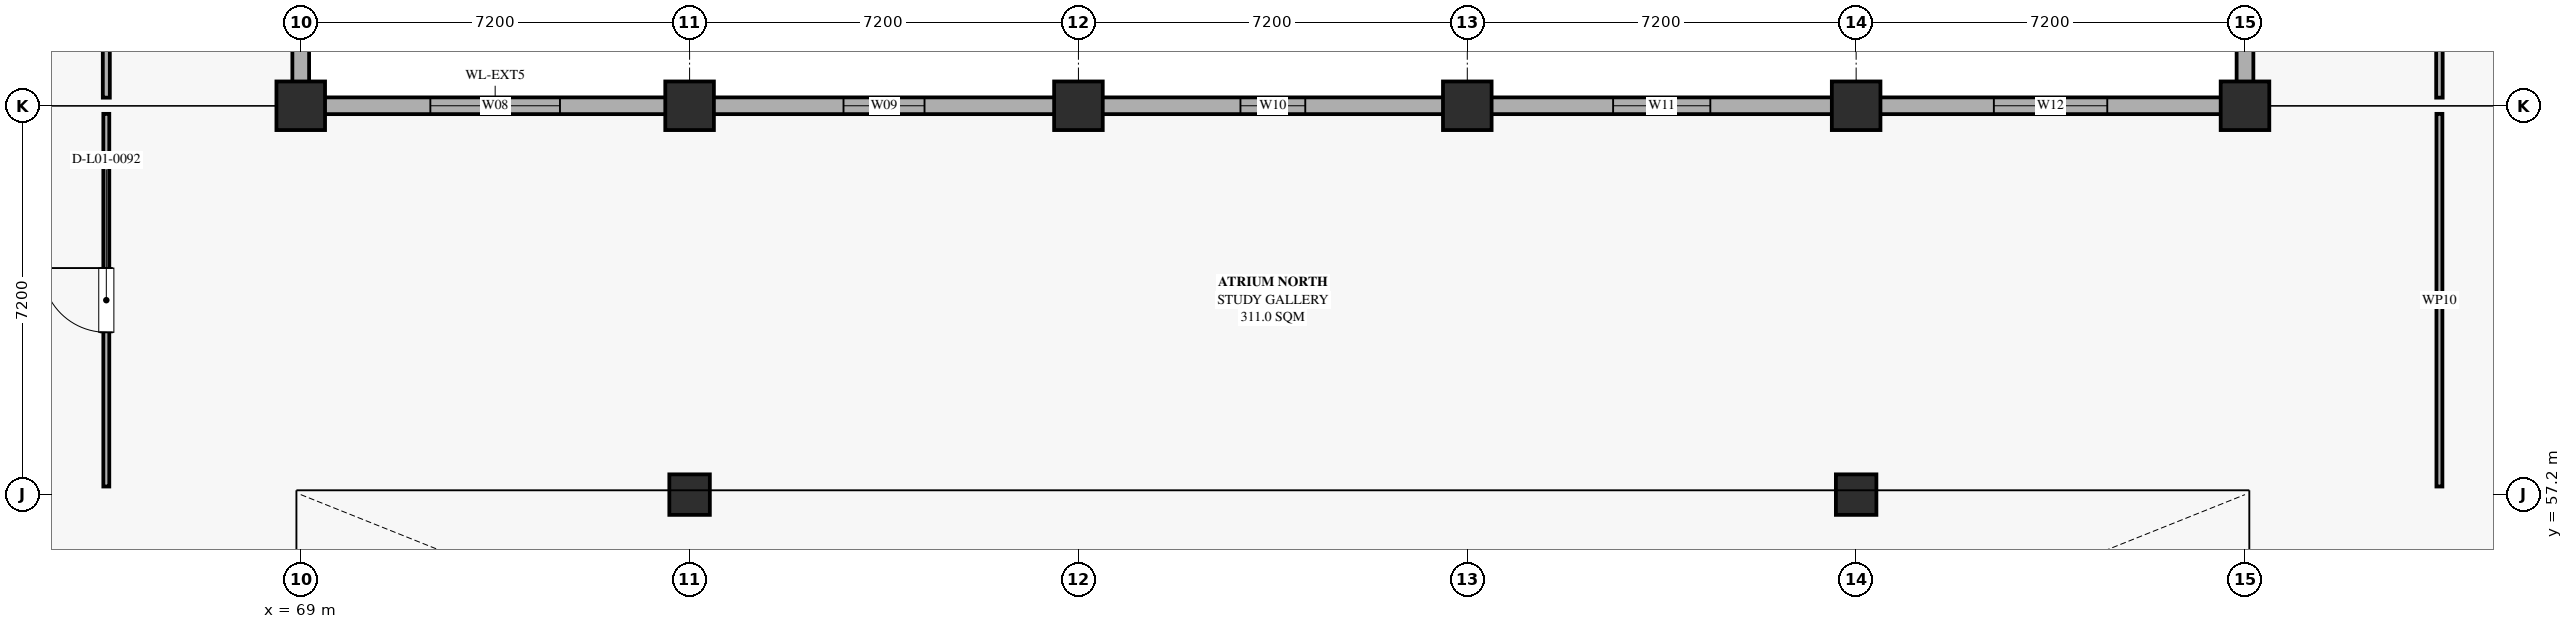
"""IFC4 building model, lengths in metres.
Left out: names, types, materials, properties, quantities, classifications, styles, units other than length and angle.
Written with IfcOpenShell. Run it as: python <this file> out.ifc"""

import sys

from ifc_helpers import new_model, si_unit, direction, frame, frame_2d, origin, origin_2d, place, context, subcontext, project, spatial, rectangle, circle, extrude, element, fill, save


model = new_model("IFC4")
c1 = context("Model", 3, precision=1e-05, world=origin(), true_north=direction((0.0, 1.0)))
c2 = subcontext(c1, "Body", "Model", "MODEL_VIEW")
j1 = project(units=[si_unit("LENGTHUNIT", "METRE"), si_unit("PLANEANGLEUNIT", "RADIAN")], contexts=[c1])
p1 = place(None, origin())
s1 = spatial("IfcSite", under=j1, at=p1, CompositionType="ELEMENT")
p2 = place(p1, origin())
s2 = spatial("IfcBuilding", under=s1, at=p2, CompositionType="ELEMENT")
p3 = place(p2, frame((0.0, 0.0, 5.4)))
s3 = spatial("IfcBuildingStorey", under=s2, at=p3, CompositionType="ELEMENT", Elevation=5.4)
for number, where, z_axis, x_axis in (
    (1, (69.0, 64.4, 0.0), (0.0, 0.0, 1.0), (1.0, 0.0, 0.0)),
    (2, (76.2, 64.4, 0.0), (0.0, 0.0, 1.0), (1.0, 0.0, 0.0)),
    (3, (83.4, 64.4, 0.0), (0.0, 0.0, 1.0), (1.0, 0.0, 0.0)),
    (4, (90.6, 64.4, 0.0), (0.0, 0.0, 1.0), (1.0, 0.0, 0.0)),
    (5, (97.8, 64.4, 0.0), (0.0, 0.0, 1.0), (1.0, 0.0, 0.0)),
    (6, (105.0, 64.4, 0.0), (0.0, 0.0, 1.0), (1.0, 0.0, 0.0)),
):
    element("IfcColumn", number, at=place(p3, frame(where, z_axis=z_axis, x_axis=x_axis)), inside=s3, PredefinedType="COLUMN", context=c2, shape_type="SweptSolid", body=[
        extrude(circle(Radius=0.45, at=origin_2d()), origin(), (0.0, 0.0, 1.0), 5.04),
    ])
for number, where, z_axis, x_axis in (
    (7, (76.2, 57.2, 0.0), (0.0, 0.0, 1.0), (1.0, 0.0, 0.0)),
    (8, (97.8, 57.2, 0.0), (0.0, 0.0, 1.0), (1.0, 0.0, 0.0)),
):
    element("IfcColumn", number, at=place(p3, frame(where, z_axis=z_axis, x_axis=x_axis)), inside=s3, PredefinedType="COLUMN", context=c2, shape_type="SweptSolid", body=[
        extrude(circle(Radius=0.375, at=origin_2d()), origin(), (0.0, 0.0, 1.0), 5.04),
    ])
p4 = place(p3, frame((69.435, 64.4, 0.0), z_axis=(0.0, 0.0, 1.0), x_axis=(1.0, 0.0, 0.0)))
e9 = element("IfcWall", 9, at=p4, inside=s3, PredefinedType="SOLIDWALL", context=c2, shape_type="SweptSolid", body=[
    extrude(rectangle(XDim=6.33, YDim=0.31, at=frame_2d((3.165, 0.0))), origin(), (0.0, 0.0, 1.0), 3.54),
])
p5 = place(p4, frame((1.965, 0.0, 0.9)))
e10 = element("IfcOpeningElement", 10, at=p5, cuts=e9, PredefinedType="OPENING", context=c2, shape_type="SweptSolid", body=[
    extrude(rectangle(XDim=2.4, YDim=2.1, at=frame_2d((1.2, 1.05))), frame((0.0, 0.165, 0.0), z_axis=(0.0, -1.0, 0.0), x_axis=(1.0, 0.0, 0.0)), (0.0, 0.0, 1.0), 0.33),
])
p6 = place(p3, frame((76.635, 64.4, 0.0), z_axis=(0.0, 0.0, 1.0), x_axis=(1.0, 0.0, 0.0)))
e11 = element("IfcWall", 11, at=p6, inside=s3, PredefinedType="SOLIDWALL", context=c2, shape_type="SweptSolid", body=[
    extrude(rectangle(XDim=6.33, YDim=0.31, at=frame_2d((3.165, 0.0))), origin(), (0.0, 0.0, 1.0), 3.54),
])
p7 = place(p6, frame((2.415, 0.0, 0.9)))
e12 = element("IfcOpeningElement", 12, at=p7, cuts=e11, PredefinedType="OPENING", context=c2, shape_type="SweptSolid", body=[
    extrude(rectangle(XDim=1.5, YDim=2.1, at=frame_2d((0.75, 1.05))), frame((0.0, 0.165, 0.0), z_axis=(0.0, -1.0, 0.0), x_axis=(1.0, 0.0, 0.0)), (0.0, 0.0, 1.0), 0.33),
])
p8 = place(p3, frame((83.835, 64.4, 0.0), z_axis=(0.0, 0.0, 1.0), x_axis=(1.0, 0.0, 0.0)))
e13 = element("IfcWall", 13, at=p8, inside=s3, PredefinedType="SOLIDWALL", context=c2, shape_type="SweptSolid", body=[
    extrude(rectangle(XDim=6.33, YDim=0.31, at=frame_2d((3.165, 0.0))), origin(), (0.0, 0.0, 1.0), 3.54),
])
p9 = place(p8, frame((2.565, 0.0, 0.9)))
e14 = element("IfcOpeningElement", 14, at=p9, cuts=e13, PredefinedType="OPENING", context=c2, shape_type="SweptSolid", body=[
    extrude(rectangle(XDim=1.2, YDim=2.1, at=frame_2d((0.6, 1.05))), frame((0.0, 0.165, 0.0), z_axis=(0.0, -1.0, 0.0), x_axis=(1.0, 0.0, 0.0)), (0.0, 0.0, 1.0), 0.33),
])
p10 = place(p3, frame((91.035, 64.4, 0.0), z_axis=(0.0, 0.0, 1.0), x_axis=(1.0, 0.0, 0.0)))
e15 = element("IfcWall", 15, at=p10, inside=s3, PredefinedType="SOLIDWALL", context=c2, shape_type="SweptSolid", body=[
    extrude(rectangle(XDim=6.33, YDim=0.31, at=frame_2d((3.165, 0.0))), origin(), (0.0, 0.0, 1.0), 3.54),
])
p11 = place(p10, frame((2.265, 0.0, 0.9)))
e16 = element("IfcOpeningElement", 16, at=p11, cuts=e15, PredefinedType="OPENING", context=c2, shape_type="SweptSolid", body=[
    extrude(rectangle(XDim=1.8, YDim=1.8, at=frame_2d((0.9, 0.9))), frame((0.0, 0.165, 0.0), z_axis=(0.0, -1.0, 0.0), x_axis=(1.0, 0.0, 0.0)), (0.0, 0.0, 1.0), 0.33),
])
p12 = place(p3, frame((98.235, 64.4, 0.0), z_axis=(0.0, 0.0, 1.0), x_axis=(1.0, 0.0, 0.0)))
e17 = element("IfcWall", 17, at=p12, inside=s3, PredefinedType="SOLIDWALL", context=c2, shape_type="SweptSolid", body=[
    extrude(rectangle(XDim=6.33, YDim=0.31, at=frame_2d((3.165, 0.0))), origin(), (0.0, 0.0, 1.0), 3.54),
])
p13 = place(p12, frame((2.115, 0.0, 0.9)))
e18 = element("IfcOpeningElement", 18, at=p13, cuts=e17, PredefinedType="OPENING", context=c2, shape_type="SweptSolid", body=[
    extrude(rectangle(XDim=2.1, YDim=1.8, at=frame_2d((1.05, 0.9))), frame((0.0, 0.165, 0.0), z_axis=(0.0, -1.0, 0.0), x_axis=(1.0, 0.0, 0.0)), (0.0, 0.0, 1.0), 0.33),
])
p14 = place(p3, frame((69.0, 71.19, 0.0), z_axis=(0.0, 0.0, 1.0), x_axis=(0.0, -1.0, 0.0)))
e19 = element("IfcWall", 19, at=p14, inside=s3, PredefinedType="SOLIDWALL", context=c2, shape_type="SweptSolid", body=[
    extrude(rectangle(XDim=6.355, YDim=0.31, at=frame_2d((3.177, 0.0))), origin(), (0.0, 0.0, 1.0), 3.54),
])
p15 = place(p14, frame((2.327, 0.0, 0.9)))
e20 = element("IfcOpeningElement", 20, at=p15, cuts=e19, PredefinedType="OPENING", context=c2, shape_type="SweptSolid", body=[
    extrude(rectangle(XDim=1.7, YDim=2.0, at=frame_2d((0.85, 1.0))), frame((0.0, 0.165, 0.0), z_axis=(0.0, -1.0, 0.0), x_axis=(1.0, 0.0, 0.0)), (0.0, 0.0, 1.0), 0.33),
])
p16 = place(p3, frame((105.0, 64.835, 0.0), z_axis=(0.0, 0.0, 1.0), x_axis=(0.0, 1.0, 0.0)))
e21 = element("IfcWall", 21, at=p16, inside=s3, PredefinedType="SOLIDWALL", context=c2, shape_type="SweptSolid", body=[
    extrude(rectangle(XDim=6.355, YDim=0.31, at=frame_2d((3.177, 0.0))), origin(), (0.0, 0.0, 1.0), 3.54),
])
p17 = place(p16, frame((2.228, 0.0, 0.9)))
e22 = element("IfcOpeningElement", 22, at=p17, cuts=e21, PredefinedType="OPENING", context=c2, shape_type="SweptSolid", body=[
    extrude(rectangle(XDim=1.9, YDim=2.0, at=frame_2d((0.95, 1.0))), frame((0.0, 0.165, 0.0), z_axis=(0.0, -1.0, 0.0), x_axis=(1.0, 0.0, 0.0)), (0.0, 0.0, 1.0), 0.33),
])
p18 = place(p3, frame((65.4, 57.35, 0.0), z_axis=(0.0, 0.0, 1.0), x_axis=(0.0, 1.0, 0.0)))
e23 = element("IfcWall", 23, at=p18, inside=s3, PredefinedType="PARTITIONING", context=c2, shape_type="SweptSolid", body=[
    extrude(rectangle(XDim=6.9, YDim=0.11, at=frame_2d((3.45, 0.0))), origin(), (0.0, 0.0, 1.0), 3.52),
])
p19 = place(p18, frame((2.855, 0.0, 0.0)))
e24 = element("IfcOpeningElement", 24, at=p19, cuts=e23, PredefinedType="OPENING", context=c2, shape_type="SweptSolid", body=[
    extrude(rectangle(XDim=1.19, YDim=2.05, at=frame_2d((0.595, 1.025))), frame((0.0, 0.065, 0.0), z_axis=(0.0, -1.0, 0.0), x_axis=(1.0, 0.0, 0.0)), (0.0, 0.0, 1.0), 0.13),
])
p20 = place(p3, frame((108.6, 64.25, 0.0), z_axis=(0.0, 0.0, 1.0), x_axis=(0.0, -1.0, 0.0)))
e25 = element("IfcWall", 25, at=p20, inside=s3, PredefinedType="PARTITIONING", context=c2, shape_type="SweptSolid", body=[
    extrude(rectangle(XDim=6.9, YDim=0.11, at=frame_2d((3.45, 0.0))), origin(), (0.0, 0.0, 1.0), 3.52),
])
p21 = place(p3, frame((65.4, 64.55, 0.0), z_axis=(0.0, 0.0, 1.0), x_axis=(0.0, 1.0, 0.0)))
e26 = element("IfcWall", 26, at=p21, inside=s3, PredefinedType="PARTITIONING", context=c2, shape_type="SweptSolid", body=[
    extrude(rectangle(XDim=21.3, YDim=0.13, at=frame_2d((10.65, 0.0))), origin(), (0.0, 0.0, 1.0), 3.52),
])
p22 = place(p21, frame((10.055, 0.0, 0.0)))
e27 = element("IfcOpeningElement", 27, at=p22, cuts=e26, PredefinedType="OPENING", context=c2, shape_type="SweptSolid", body=[
    extrude(rectangle(XDim=1.19, YDim=2.1, at=frame_2d((0.595, 1.05))), frame((0.0, 0.075, 0.0), z_axis=(0.0, -1.0, 0.0), x_axis=(1.0, 0.0, 0.0)), (0.0, 0.0, 1.0), 0.15),
])
p23 = place(p3, frame((108.6, 85.85, 0.0), z_axis=(0.0, 0.0, 1.0), x_axis=(0.0, -1.0, 0.0)))
e28 = element("IfcWall", 28, at=p23, inside=s3, PredefinedType="PARTITIONING", context=c2, shape_type="SweptSolid", body=[
    extrude(rectangle(XDim=21.3, YDim=0.12, at=frame_2d((10.65, 0.0))), origin(), (0.0, 0.0, 1.0), 3.52),
])
p24 = place(p23, frame((10.055, 0.0, 0.0)))
e29 = element("IfcOpeningElement", 29, at=p24, cuts=e28, PredefinedType="OPENING", context=c2, shape_type="SweptSolid", body=[
    extrude(rectangle(XDim=1.19, YDim=2.16, at=frame_2d((0.595, 1.08))), frame((0.0, 0.07, 0.0), z_axis=(0.0, -1.0, 0.0), x_axis=(1.0, 0.0, 0.0)), (0.0, 0.0, 1.0), 0.14),
])
p25 = place(p5, origin())
e30 = element("IfcWindow", 30, at=p25, inside=s3, PartitioningType="DOUBLE_PANEL_VERTICAL", PredefinedType="WINDOW", context=c2, shape_type="SweptSolid", body=[
    extrude(rectangle(XDim=2.4, YDim=2.1, at=frame_2d((1.2, 1.05))), frame((0.0, 0.03, 0.0), z_axis=(0.0, -1.0, 0.0), x_axis=(1.0, 0.0, 0.0)), (0.0, 0.0, 1.0), 0.06),
])
fill(e10, e30)
p26 = place(p7, origin())
e31 = element("IfcWindow", 31, at=p26, inside=s3, PartitioningType="SINGLE_PANEL", PredefinedType="WINDOW", context=c2, shape_type="SweptSolid", body=[
    extrude(rectangle(XDim=1.5, YDim=2.1, at=frame_2d((0.75, 1.05))), frame((0.0, 0.03, 0.0), z_axis=(0.0, -1.0, 0.0), x_axis=(1.0, 0.0, 0.0)), (0.0, 0.0, 1.0), 0.06),
])
fill(e12, e31)
p27 = place(p9, origin())
e32 = element("IfcWindow", 32, at=p27, inside=s3, PartitioningType="SINGLE_PANEL", PredefinedType="WINDOW", context=c2, shape_type="SweptSolid", body=[
    extrude(rectangle(XDim=1.2, YDim=2.1, at=frame_2d((0.6, 1.05))), frame((0.0, 0.03, 0.0), z_axis=(0.0, -1.0, 0.0), x_axis=(1.0, 0.0, 0.0)), (0.0, 0.0, 1.0), 0.06),
])
fill(e14, e32)
p28 = place(p11, origin())
e33 = element("IfcWindow", 33, at=p28, inside=s3, PartitioningType="DOUBLE_PANEL_VERTICAL", PredefinedType="WINDOW", context=c2, shape_type="SweptSolid", body=[
    extrude(rectangle(XDim=1.8, YDim=1.8, at=frame_2d((0.9, 0.9))), frame((0.0, 0.03, 0.0), z_axis=(0.0, -1.0, 0.0), x_axis=(1.0, 0.0, 0.0)), (0.0, 0.0, 1.0), 0.06),
])
fill(e16, e33)
p29 = place(p13, origin())
e34 = element("IfcWindow", 34, at=p29, inside=s3, PartitioningType="DOUBLE_PANEL_VERTICAL", PredefinedType="WINDOW", context=c2, shape_type="SweptSolid", body=[
    extrude(rectangle(XDim=2.1, YDim=1.8, at=frame_2d((1.05, 0.9))), frame((0.0, 0.03, 0.0), z_axis=(0.0, -1.0, 0.0), x_axis=(1.0, 0.0, 0.0)), (0.0, 0.0, 1.0), 0.06),
])
fill(e18, e34)
p30 = place(p19, origin())
e35 = element("IfcDoor", 35, at=p30, inside=s3, OperationType="SINGLE_SWING_RIGHT", PredefinedType="DOOR", context=c2, shape_type="SweptSolid", body=[
    extrude(rectangle(XDim=1.19, YDim=2.05, at=frame_2d((0.595, 1.025))), frame((0.0, 0.025, 0.0), z_axis=(0.0, -1.0, 0.0), x_axis=(1.0, 0.0, 0.0)), (0.0, 0.0, 1.0), 0.05),
])
fill(e24, e35)
save(model, sys.argv[1])
